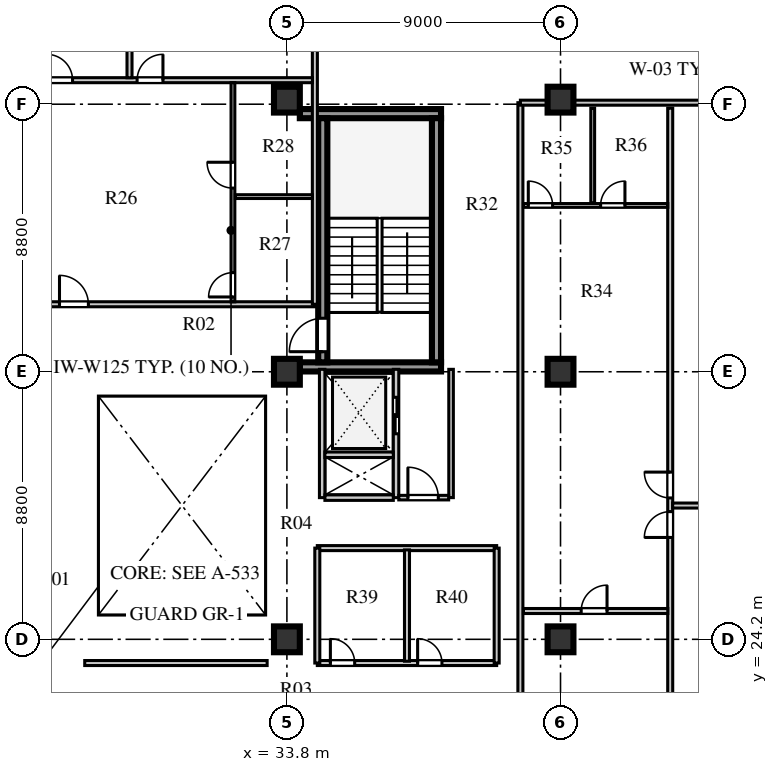
"""IFC4 building model, lengths in metres.
Left out: names, types, materials, properties, quantities, classifications, styles, units other than length and angle.
Written with IfcOpenShell. Run it as: python <this file> out.ifc"""

import sys

from ifc_helpers import new_model, si_unit, direction, frame, frame_2d, origin, origin_2d, place, context, subcontext, project, spatial, rectangle, extrude, element, fill, save


model = new_model("IFC4")
c1 = context("Model", 3, precision=1e-05, world=origin(), true_north=direction((0.0, 1.0)))
c2 = subcontext(c1, "Body", "Model", "MODEL_VIEW")
j1 = project(units=[si_unit("LENGTHUNIT", "METRE"), si_unit("PLANEANGLEUNIT", "RADIAN")], contexts=[c1])
p1 = place(None, origin())
s1 = spatial("IfcSite", under=j1, at=p1, CompositionType="ELEMENT")
p2 = place(p1, origin())
s2 = spatial("IfcBuilding", under=s1, at=p2, CompositionType="ELEMENT")
p3 = place(p2, frame((0.0, 0.0, 253.1)))
s3 = spatial("IfcBuildingStorey", under=s2, at=p3, CompositionType="ELEMENT", Elevation=253.1)
for number, where, z_axis, x_axis in (
    (1, (34.225, 33.16, 0.0), (0.0, 0.0, 1.0), (1.0, 0.0, 0.0)),
    (2, (34.225, 41.49, 0.0), (0.0, 0.0, 1.0), (1.0, 0.0, 0.0)),
):
    element("IfcWall", number, at=place(p3, frame(where, z_axis=z_axis, x_axis=x_axis)), inside=s3, PredefinedType="SHEAR", context=c2, shape_type="SweptSolid", body=[
        extrude(rectangle(XDim=4.645, YDim=0.3, at=frame_2d((2.323, 0.0))), origin(), (0.0, 0.0, 1.0), 3.66),
    ])
p4 = place(p3, frame((34.98, 33.31, 0.0), z_axis=(0.0, 0.0, 1.0), x_axis=(0.0, 1.0, 0.0)))
e3 = element("IfcWall", 3, at=p4, inside=s3, PredefinedType="SHEAR", context=c2, shape_type="SweptSolid", body=[
    extrude(rectangle(XDim=8.03, YDim=0.3, at=frame_2d((4.015, 0.0))), origin(), (0.0, 0.0, 1.0), 3.66),
])
p5 = place(p4, frame((0.35, 0.0, 0.0)))
e4 = element("IfcOpeningElement", 4, at=p5, cuts=e3, PredefinedType="OPENING", context=c2, shape_type="SweptSolid", body=[
    extrude(rectangle(XDim=1.1, YDim=2.1, at=frame_2d((0.55, 1.05))), frame((0.0, 0.16, 0.0), z_axis=(0.0, -1.0, 0.0), x_axis=(1.0, 0.0, 0.0)), (0.0, 0.0, 1.0), 0.32),
])
p6 = place(p3, frame((38.72, 33.31, 0.0), z_axis=(0.0, 0.0, 1.0), x_axis=(0.0, 1.0, 0.0)))
e5 = element("IfcWall", 5, at=p6, inside=s3, PredefinedType="SHEAR", context=c2, shape_type="SweptSolid", body=[
    extrude(rectangle(XDim=8.03, YDim=0.3, at=frame_2d((4.015, 0.0))), origin(), (0.0, 0.0, 1.0), 3.66),
])
for number, where, z_axis, x_axis in (
    (6, (33.8, 24.2, 0.0), (0.0, 0.0, 1.0), (1.0, 0.0, 0.0)),
    (7, (33.8, 33.0, 0.0), (0.0, 0.0, 1.0), (1.0, 0.0, 0.0)),
    (8, (33.8, 41.95, 0.0), (0.0, 0.0, 1.0), (1.0, 0.0, 0.0)),
    (9, (42.8, 24.2, 0.0), (0.0, 0.0, 1.0), (1.0, 0.0, 0.0)),
    (10, (42.8, 33.0, 0.0), (0.0, 0.0, 1.0), (1.0, 0.0, 0.0)),
    (11, (42.8, 41.95, 0.0), (0.0, 0.0, 1.0), (1.0, 0.0, 0.0)),
):
    element("IfcColumn", number, at=place(p3, frame(where, z_axis=z_axis, x_axis=x_axis)), inside=s3, PredefinedType="COLUMN", context=c2, shape_type="SweptSolid", body=[
        extrude(rectangle(XDim=0.85, YDim=0.85, at=origin_2d()), origin(), (0.0, 0.0, 1.0), 3.66),
    ])
p7 = place(p3, frame((34.96, 28.86, 0.0), z_axis=(0.0, 0.0, 1.0), x_axis=(0.0, 1.0, 0.0)))
e12 = element("IfcWall", 12, at=p7, inside=s3, PredefinedType="SOLIDWALL", context=c2, shape_type="SweptSolid", body=[
    extrude(rectangle(XDim=4.22, YDim=0.18, at=frame_2d((2.11, 0.0))), origin(), (0.0, 0.0, 1.0), 3.66),
])
p8 = place(p3, frame((37.39, 28.86, 0.0), z_axis=(0.0, 0.0, 1.0), x_axis=(0.0, 1.0, 0.0)))
e13 = element("IfcWall", 13, at=p8, inside=s3, PredefinedType="SOLIDWALL", context=c2, shape_type="SweptSolid", body=[
    extrude(rectangle(XDim=4.22, YDim=0.18, at=frame_2d((2.11, 0.0))), origin(), (0.0, 0.0, 1.0), 3.66),
])
p9 = place(p8, frame((2.1, 0.0, 0.0)))
e14 = element("IfcOpeningElement", 14, at=p9, cuts=e13, PredefinedType="OPENING", context=c2, shape_type="SweptSolid", body=[
    extrude(rectangle(XDim=1.2, YDim=2.12, at=frame_2d((0.6, 1.06))), frame((0.0, 0.1, 0.0), z_axis=(0.0, -1.0, 0.0), x_axis=(1.0, 0.0, 0.0)), (0.0, 0.0, 1.0), 0.2),
])
for number, where, z_axis, x_axis in (
    (15, (35.05, 28.86, 0.0), (0.0, 0.0, 1.0), (1.0, 0.0, 0.0)),
    (16, (35.05, 30.27, 0.0), (0.0, 0.0, 1.0), (1.0, 0.0, 0.0)),
):
    element("IfcWall", number, at=place(p3, frame(where, z_axis=z_axis, x_axis=x_axis)), inside=s3, PredefinedType="SOLIDWALL", context=c2, shape_type="SweptSolid", body=[
        extrude(rectangle(XDim=2.25, YDim=0.18, at=frame_2d((1.125, 0.0))), origin(), (0.0, 0.0, 1.0), 3.66),
    ])
p10 = place(p3, frame((39.2, 28.86, 0.0), z_axis=(0.0, 0.0, 1.0), x_axis=(0.0, 1.0, 0.0)))
e17 = element("IfcWall", 17, at=p10, inside=s3, PredefinedType="PARTITIONING", context=c2, shape_type="SweptSolid", body=[
    extrude(rectangle(XDim=4.22, YDim=0.15, at=frame_2d((2.11, 0.0))), origin(), (0.0, 0.0, 1.0), 3.66),
])
p11 = place(p3, frame((37.48, 28.86, 0.0), z_axis=(0.0, 0.0, 1.0), x_axis=(1.0, 0.0, 0.0)))
e18 = element("IfcWall", 18, at=p11, inside=s3, PredefinedType="PARTITIONING", context=c2, shape_type="SweptSolid", body=[
    extrude(rectangle(XDim=1.64, YDim=0.15, at=frame_2d((0.82, 0.0))), origin(), (0.0, 0.0, 1.0), 3.66),
])
p12 = place(p11, frame((0.3, 0.0, 0.0)))
e19 = element("IfcOpeningElement", 19, at=p12, cuts=e18, PredefinedType="OPENING", context=c2, shape_type="SweptSolid", body=[
    extrude(rectangle(XDim=1.0, YDim=2.1, at=frame_2d((0.5, 1.05))), frame((0.0, 0.085, 0.0), z_axis=(0.0, -1.0, 0.0), x_axis=(1.0, 0.0, 0.0)), (0.0, 0.0, 1.0), 0.17),
])
p13 = place(p3, frame((27.15, 23.42, 0.0), z_axis=(0.0, 0.0, 1.0), x_axis=(1.0, 0.0, 0.0)))
e20 = element("IfcWall", 20, at=p13, inside=s3, PredefinedType="PARTITIONING", context=c2, shape_type="SweptSolid", body=[
    extrude(rectangle(XDim=6.0, YDim=0.165, at=frame_2d((3.0, 0.0))), origin(), (0.0, 0.0, 1.0), 3.66),
])
p14 = place(p3, frame((25.22, 35.22, 0.0), z_axis=(0.0, 0.0, 1.0), x_axis=(1.0, 0.0, 0.0)))
e21 = element("IfcWall", 21, at=p14, inside=s3, PredefinedType="PARTITIONING", context=c2, shape_type="SweptSolid", body=[
    extrude(rectangle(XDim=9.5, YDim=0.165, at=frame_2d((4.75, 0.0))), origin(), (0.0, 0.0, 1.0), 3.66),
])
p15 = place(p14, frame((1.1, 0.0, 0.0)))
e22 = element("IfcOpeningElement", 22, at=p15, cuts=e21, PredefinedType="OPENING", context=c2, shape_type="SweptSolid", body=[
    extrude(rectangle(XDim=0.95, YDim=2.1, at=frame_2d((0.475, 1.05))), frame((0.0, 0.093, 0.0), z_axis=(0.0, -1.0, 0.0), x_axis=(1.0, 0.0, 0.0)), (0.0, 0.0, 1.0), 0.185),
])
p16 = place(p3, frame((34.72, 35.22, 0.0), z_axis=(0.0, 0.0, 1.0), x_axis=(0.0, 1.0, 0.0)))
e23 = element("IfcWall", 23, at=p16, inside=s3, PredefinedType="PARTITIONING", context=c2, shape_type="SweptSolid", body=[
    extrude(rectangle(XDim=14.1, YDim=0.165, at=frame_2d((7.05, 0.0))), origin(), (0.0, 0.0, 1.0), 3.66),
])
p17 = place(p3, frame((25.3, 42.59, 0.0), z_axis=(0.0, 0.0, 1.0), x_axis=(1.0, 0.0, 0.0)))
e24 = element("IfcWall", 24, at=p17, inside=s3, PredefinedType="PARTITIONING", context=c2, shape_type="SweptSolid", body=[
    extrude(rectangle(XDim=9.34, YDim=0.165, at=frame_2d((4.67, 0.0))), origin(), (0.0, 0.0, 1.0), 3.66),
])
p18 = place(p17, frame((0.6, 0.0, 0.0)))
e25 = element("IfcOpeningElement", 25, at=p18, cuts=e24, PredefinedType="OPENING", context=c2, shape_type="SweptSolid", body=[
    extrude(rectangle(XDim=0.85, YDim=2.08, at=frame_2d((0.425, 1.04))), frame((0.0, 0.093, 0.0), z_axis=(0.0, -1.0, 0.0), x_axis=(1.0, 0.0, 0.0)), (0.0, 0.0, 1.0), 0.185),
])
p19 = place(p17, frame((3.573, 0.0, 0.0)))
e26 = element("IfcOpeningElement", 26, at=p19, cuts=e24, PredefinedType="OPENING", context=c2, shape_type="SweptSolid", body=[
    extrude(rectangle(XDim=0.85, YDim=2.08, at=frame_2d((0.425, 1.04))), frame((0.0, 0.093, 0.0), z_axis=(0.0, -1.0, 0.0), x_axis=(1.0, 0.0, 0.0)), (0.0, 0.0, 1.0), 0.185),
])
p20 = place(p3, frame((32.025, 35.3, 0.0), z_axis=(0.0, 0.0, 1.0), x_axis=(0.0, 1.0, 0.0)))
e27 = element("IfcWall", 27, at=p20, inside=s3, PredefinedType="PLUMBINGWALL", context=c2, shape_type="SweptSolid", body=[
    extrude(rectangle(XDim=7.21, YDim=0.125, at=frame_2d((3.605, 0.0))), origin(), (0.0, 0.0, 1.0), 3.66),
])
p21 = place(p20, frame((0.16, 0.0, 0.0)))
e28 = element("IfcOpeningElement", 28, at=p21, cuts=e27, PredefinedType="OPENING", context=c2, shape_type="SweptSolid", body=[
    extrude(rectangle(XDim=0.8, YDim=2.05, at=frame_2d((0.4, 1.025))), frame((0.0, 0.073, 0.0), z_axis=(0.0, -1.0, 0.0), x_axis=(1.0, 0.0, 0.0)), (0.0, 0.0, 1.0), 0.145),
])
p22 = place(p20, frame((3.741, 0.0, 0.0)))
e29 = element("IfcOpeningElement", 29, at=p22, cuts=e27, PredefinedType="OPENING", context=c2, shape_type="SweptSolid", body=[
    extrude(rectangle(XDim=0.85, YDim=2.08, at=frame_2d((0.425, 1.04))), frame((0.0, 0.073, 0.0), z_axis=(0.0, -1.0, 0.0), x_axis=(1.0, 0.0, 0.0)), (0.0, 0.0, 1.0), 0.145),
])
p23 = place(p3, frame((32.105, 38.761, 0.0), z_axis=(0.0, 0.0, 1.0), x_axis=(1.0, 0.0, 0.0)))
e30 = element("IfcWall", 30, at=p23, inside=s3, PredefinedType="PLUMBINGWALL", context=c2, shape_type="SweptSolid", body=[
    extrude(rectangle(XDim=2.535, YDim=0.125, at=frame_2d((1.268, 0.0))), origin(), (0.0, 0.0, 1.0), 3.66),
])
p24 = place(p3, frame((28.623, 42.67, 0.0), z_axis=(0.0, 0.0, 1.0), x_axis=(0.0, 1.0, 0.0)))
e31 = element("IfcWall", 31, at=p24, inside=s3, PredefinedType="PARTITIONING", context=c2, shape_type="SweptSolid", body=[
    extrude(rectangle(XDim=6.65, YDim=0.165, at=frame_2d((3.325, 0.0))), origin(), (0.0, 0.0, 1.0), 3.66),
])
p25 = place(p3, frame((41.48, 15.35, 0.0), z_axis=(0.0, 0.0, 1.0), x_axis=(0.0, 1.0, 0.0)))
e32 = element("IfcWall", 32, at=p25, inside=s3, PredefinedType="PARTITIONING", context=c2, shape_type="SweptSolid", body=[
    extrude(rectangle(XDim=26.5, YDim=0.165, at=frame_2d((13.25, 0.0))), origin(), (0.0, 0.0, 1.0), 3.66),
])
p26 = place(p25, frame((0.75, 0.0, 0.0)))
e33 = element("IfcOpeningElement", 33, at=p26, cuts=e32, PredefinedType="OPENING", context=c2, shape_type="SweptSolid", body=[
    extrude(rectangle(XDim=0.95, YDim=2.1, at=frame_2d((0.475, 1.05))), frame((0.0, 0.093, 0.0), z_axis=(0.0, -1.0, 0.0), x_axis=(1.0, 0.0, 0.0)), (0.0, 0.0, 1.0), 0.185),
])
p27 = place(p3, frame((41.48, 41.85, 0.0), z_axis=(0.0, 0.0, 1.0), x_axis=(1.0, 0.0, 0.0)))
e34 = element("IfcWall", 34, at=p27, inside=s3, PredefinedType="PARTITIONING", context=c2, shape_type="SweptSolid", body=[
    extrude(rectangle(XDim=9.04, YDim=0.165, at=frame_2d((4.52, 0.0))), origin(), (0.0, 0.0, 1.0), 3.06),
])
p28 = place(p3, frame((46.408, 15.53, 0.0), z_axis=(0.0, 0.0, 1.0), x_axis=(0.0, 1.0, 0.0)))
e35 = element("IfcWall", 35, at=p28, inside=s3, PredefinedType="PARTITIONING", context=c2, shape_type="SweptSolid", body=[
    extrude(rectangle(XDim=26.14, YDim=0.165, at=frame_2d((13.07, 0.0))), origin(), (0.0, 0.0, 1.0), 3.66),
])
p29 = place(p28, frame((12.02, 0.0, 0.0)))
e36 = element("IfcOpeningElement", 36, at=p29, cuts=e35, PredefinedType="OPENING", context=c2, shape_type="SweptSolid", body=[
    extrude(rectangle(XDim=0.85, YDim=2.08, at=frame_2d((0.425, 1.04))), frame((0.0, 0.093, 0.0), z_axis=(0.0, -1.0, 0.0), x_axis=(1.0, 0.0, 0.0)), (0.0, 0.0, 1.0), 0.185),
])
p30 = place(p28, frame((13.32, 0.0, 0.0)))
e37 = element("IfcOpeningElement", 37, at=p30, cuts=e35, PredefinedType="OPENING", context=c2, shape_type="SweptSolid", body=[
    extrude(rectangle(XDim=0.85, YDim=2.08, at=frame_2d((0.425, 1.04))), frame((0.0, 0.093, 0.0), z_axis=(0.0, -1.0, 0.0), x_axis=(1.0, 0.0, 0.0)), (0.0, 0.0, 1.0), 0.185),
])
p31 = place(p3, frame((41.58, 38.47, 0.0), z_axis=(0.0, 0.0, 1.0), x_axis=(1.0, 0.0, 0.0)))
e38 = element("IfcWall", 38, at=p31, inside=s3, PredefinedType="PLUMBINGWALL", context=c2, shape_type="SweptSolid", body=[
    extrude(rectangle(XDim=4.748, YDim=0.125, at=frame_2d((2.374, 0.0))), origin(), (0.0, 0.0, 1.0), 3.66),
])
p32 = place(p31, frame((0.16, 0.0, 0.0)))
e39 = element("IfcOpeningElement", 39, at=p32, cuts=e38, PredefinedType="OPENING", context=c2, shape_type="SweptSolid", body=[
    extrude(rectangle(XDim=0.8, YDim=2.05, at=frame_2d((0.4, 1.025))), frame((0.0, 0.073, 0.0), z_axis=(0.0, -1.0, 0.0), x_axis=(1.0, 0.0, 0.0)), (0.0, 0.0, 1.0), 0.145),
])
p33 = place(p31, frame((2.539, 0.0, 0.0)))
e40 = element("IfcOpeningElement", 40, at=p33, cuts=e38, PredefinedType="OPENING", context=c2, shape_type="SweptSolid", body=[
    extrude(rectangle(XDim=0.8, YDim=2.05, at=frame_2d((0.4, 1.025))), frame((0.0, 0.073, 0.0), z_axis=(0.0, -1.0, 0.0), x_axis=(1.0, 0.0, 0.0)), (0.0, 0.0, 1.0), 0.145),
])
p34 = place(p3, frame((43.859, 38.55, 0.0), z_axis=(0.0, 0.0, 1.0), x_axis=(0.0, 1.0, 0.0)))
e41 = element("IfcWall", 41, at=p34, inside=s3, PredefinedType="PLUMBINGWALL", context=c2, shape_type="SweptSolid", body=[
    extrude(rectangle(XDim=3.12, YDim=0.125, at=frame_2d((1.56, 0.0))), origin(), (0.0, 0.0, 1.0), 3.66),
])
p35 = place(p3, frame((41.58, 25.131, 0.0), z_axis=(0.0, 0.0, 1.0), x_axis=(1.0, 0.0, 0.0)))
e42 = element("IfcWall", 42, at=p35, inside=s3, PredefinedType="PARTITIONING", context=c2, shape_type="SweptSolid", body=[
    extrude(rectangle(XDim=4.748, YDim=0.165, at=frame_2d((2.374, 0.0))), origin(), (0.0, 0.0, 1.0), 3.66),
])
p36 = place(p35, frame((1.9, 0.0, 0.0)))
e43 = element("IfcOpeningElement", 43, at=p36, cuts=e42, PredefinedType="OPENING", context=c2, shape_type="SweptSolid", body=[
    extrude(rectangle(XDim=0.85, YDim=2.08, at=frame_2d((0.425, 1.04))), frame((0.0, 0.093, 0.0), z_axis=(0.0, -1.0, 0.0), x_axis=(1.0, 0.0, 0.0)), (0.0, 0.0, 1.0), 0.185),
])
p37 = place(p3, frame((46.488, 28.6, 0.0), z_axis=(0.0, 0.0, 1.0), x_axis=(1.0, 0.0, 0.0)))
e44 = element("IfcWall", 44, at=p37, inside=s3, PredefinedType="PARTITIONING", context=c2, shape_type="SweptSolid", body=[
    extrude(rectangle(XDim=4.032, YDim=0.165, at=frame_2d((2.016, 0.0))), origin(), (0.0, 0.0, 1.0), 3.66),
])
p38 = place(p3, frame((34.8, 23.42, 0.0), z_axis=(0.0, 0.0, 1.0), x_axis=(1.0, 0.0, 0.0)))
e45 = element("IfcWall", 45, at=p38, inside=s3, PredefinedType="PARTITIONING", context=c2, shape_type="SweptSolid", body=[
    extrude(rectangle(XDim=5.9, YDim=0.165, at=frame_2d((2.95, 0.0))), origin(), (0.0, 0.0, 1.0), 3.66),
])
p39 = place(p38, frame((0.43, 0.0, 0.0)))
e46 = element("IfcOpeningElement", 46, at=p39, cuts=e45, PredefinedType="OPENING", context=c2, shape_type="SweptSolid", body=[
    extrude(rectangle(XDim=0.8, YDim=2.05, at=frame_2d((0.4, 1.025))), frame((0.0, 0.093, 0.0), z_axis=(0.0, -1.0, 0.0), x_axis=(1.0, 0.0, 0.0)), (0.0, 0.0, 1.0), 0.185),
])
p40 = place(p38, frame((3.3, 0.0, 0.0)))
e47 = element("IfcOpeningElement", 47, at=p40, cuts=e45, PredefinedType="OPENING", context=c2, shape_type="SweptSolid", body=[
    extrude(rectangle(XDim=0.8, YDim=2.05, at=frame_2d((0.4, 1.025))), frame((0.0, 0.093, 0.0), z_axis=(0.0, -1.0, 0.0), x_axis=(1.0, 0.0, 0.0)), (0.0, 0.0, 1.0), 0.185),
])
p41 = place(p3, frame((34.8, 27.2, 0.0), z_axis=(0.0, 0.0, 1.0), x_axis=(1.0, 0.0, 0.0)))
e48 = element("IfcWall", 48, at=p41, inside=s3, PredefinedType="PARTITIONING", context=c2, shape_type="SweptSolid", body=[
    extrude(rectangle(XDim=5.9, YDim=0.165, at=frame_2d((2.95, 0.0))), origin(), (0.0, 0.0, 1.0), 3.31),
])
for number, where, z_axis, x_axis in (
    (49, (34.8, 23.42, 0.0), (0.0, 0.0, 1.0), (0.0, 1.0, 0.0)),
    (50, (40.7, 23.42, 0.0), (0.0, 0.0, 1.0), (0.0, 1.0, 0.0)),
):
    element("IfcWall", number, at=place(p3, frame(where, z_axis=z_axis, x_axis=x_axis)), inside=s3, PredefinedType="PARTITIONING", context=c2, shape_type="SweptSolid", body=[
        extrude(rectangle(XDim=3.78, YDim=0.165, at=frame_2d((1.89, 0.0))), origin(), (0.0, 0.0, 1.0), 3.66),
    ])
p42 = place(p3, frame((37.75, 23.48, 0.0), z_axis=(0.0, 0.0, 1.0), x_axis=(0.0, 1.0, 0.0)))
e51 = element("IfcWall", 51, at=p42, inside=s3, PredefinedType="PARTITIONING", context=c2, shape_type="SweptSolid", body=[
    extrude(rectangle(XDim=3.66, YDim=0.165, at=frame_2d((1.83, 0.0))), origin(), (0.0, 0.0, 1.0), 3.66),
])
p43 = place(p5, origin())
e52 = element("IfcDoor", 52, at=p43, inside=s3, OperationType="SINGLE_SWING_LEFT", PredefinedType="DOOR", context=c2, shape_type="SweptSolid", body=[
    extrude(rectangle(XDim=1.1, YDim=2.1, at=frame_2d((0.55, 1.05))), frame((0.0, 0.025, 0.0), z_axis=(0.0, -1.0, 0.0), x_axis=(1.0, 0.0, 0.0)), (0.0, 0.0, 1.0), 0.05),
])
fill(e4, e52)
p44 = place(p9, frame((1.2, 0.0, 0.0), z_axis=(0.0, 0.0, 1.0), x_axis=(-1.0, 0.0, 0.0)))
e53 = element("IfcDoor", 53, at=p44, inside=s3, OperationType="DOUBLE_DOOR_SLIDING", PredefinedType="DOOR", context=c2, shape_type="SweptSolid", body=[
    extrude(rectangle(XDim=1.2, YDim=2.12, at=frame_2d((0.6, 1.06))), frame((0.0, 0.025, 0.0), z_axis=(0.0, -1.0, 0.0), x_axis=(1.0, 0.0, 0.0)), (0.0, 0.0, 1.0), 0.05),
])
fill(e14, e53)
p45 = place(p12, origin())
e54 = element("IfcDoor", 54, at=p45, inside=s3, OperationType="SINGLE_SWING_LEFT", PredefinedType="DOOR", context=c2, shape_type="SweptSolid", body=[
    extrude(rectangle(XDim=1.0, YDim=2.1, at=frame_2d((0.5, 1.05))), frame((0.0, 0.025, 0.0), z_axis=(0.0, -1.0, 0.0), x_axis=(1.0, 0.0, 0.0)), (0.0, 0.0, 1.0), 0.05),
])
fill(e19, e54)
p46 = place(p21, origin())
e55 = element("IfcDoor", 55, at=p46, inside=s3, OperationType="SINGLE_SWING_LEFT", PredefinedType="DOOR", context=c2, shape_type="SweptSolid", body=[
    extrude(rectangle(XDim=0.8, YDim=2.05, at=frame_2d((0.4, 1.025))), frame((0.0, 0.025, 0.0), z_axis=(0.0, -1.0, 0.0), x_axis=(1.0, 0.0, 0.0)), (0.0, 0.0, 1.0), 0.05),
])
fill(e28, e55)
p47 = place(p22, origin())
e56 = element("IfcDoor", 56, at=p47, inside=s3, OperationType="SINGLE_SWING_RIGHT", PredefinedType="DOOR", context=c2, shape_type="SweptSolid", body=[
    extrude(rectangle(XDim=0.85, YDim=2.08, at=frame_2d((0.425, 1.04))), frame((0.0, 0.025, 0.0), z_axis=(0.0, -1.0, 0.0), x_axis=(1.0, 0.0, 0.0)), (0.0, 0.0, 1.0), 0.05),
])
fill(e29, e56)
p48 = place(p18, origin())
e57 = element("IfcDoor", 57, at=p48, inside=s3, OperationType="SINGLE_SWING_LEFT", PredefinedType="DOOR", context=c2, shape_type="SweptSolid", body=[
    extrude(rectangle(XDim=0.85, YDim=2.08, at=frame_2d((0.425, 1.04))), frame((0.0, 0.025, 0.0), z_axis=(0.0, -1.0, 0.0), x_axis=(1.0, 0.0, 0.0)), (0.0, 0.0, 1.0), 0.05),
])
fill(e25, e57)
p49 = place(p19, origin())
e58 = element("IfcDoor", 58, at=p49, inside=s3, OperationType="SINGLE_SWING_RIGHT", PredefinedType="DOOR", context=c2, shape_type="SweptSolid", body=[
    extrude(rectangle(XDim=0.85, YDim=2.08, at=frame_2d((0.425, 1.04))), frame((0.0, 0.025, 0.0), z_axis=(0.0, -1.0, 0.0), x_axis=(1.0, 0.0, 0.0)), (0.0, 0.0, 1.0), 0.05),
])
fill(e26, e58)
p50 = place(p15, origin())
e59 = element("IfcDoor", 59, at=p50, inside=s3, OperationType="SINGLE_SWING_LEFT", PredefinedType="DOOR", context=c2, shape_type="SweptSolid", body=[
    extrude(rectangle(XDim=0.95, YDim=2.1, at=frame_2d((0.475, 1.05))), frame((0.0, 0.025, 0.0), z_axis=(0.0, -1.0, 0.0), x_axis=(1.0, 0.0, 0.0)), (0.0, 0.0, 1.0), 0.05),
])
fill(e22, e59)
p51 = place(p36, frame((0.85, 0.0, 0.0), z_axis=(0.0, 0.0, 1.0), x_axis=(-1.0, 0.0, 0.0)))
e60 = element("IfcDoor", 60, at=p51, inside=s3, OperationType="SINGLE_SWING_LEFT", PredefinedType="DOOR", context=c2, shape_type="SweptSolid", body=[
    extrude(rectangle(XDim=0.85, YDim=2.08, at=frame_2d((0.425, 1.04))), frame((0.0, 0.025, 0.0), z_axis=(0.0, -1.0, 0.0), x_axis=(1.0, 0.0, 0.0)), (0.0, 0.0, 1.0), 0.05),
])
fill(e43, e60)
p52 = place(p32, origin())
e61 = element("IfcDoor", 61, at=p52, inside=s3, OperationType="SINGLE_SWING_LEFT", PredefinedType="DOOR", context=c2, shape_type="SweptSolid", body=[
    extrude(rectangle(XDim=0.8, YDim=2.05, at=frame_2d((0.4, 1.025))), frame((0.0, 0.025, 0.0), z_axis=(0.0, -1.0, 0.0), x_axis=(1.0, 0.0, 0.0)), (0.0, 0.0, 1.0), 0.05),
])
fill(e39, e61)
p53 = place(p33, origin())
e62 = element("IfcDoor", 62, at=p53, inside=s3, OperationType="SINGLE_SWING_RIGHT", PredefinedType="DOOR", context=c2, shape_type="SweptSolid", body=[
    extrude(rectangle(XDim=0.8, YDim=2.05, at=frame_2d((0.4, 1.025))), frame((0.0, 0.025, 0.0), z_axis=(0.0, -1.0, 0.0), x_axis=(1.0, 0.0, 0.0)), (0.0, 0.0, 1.0), 0.05),
])
fill(e40, e62)
p54 = place(p29, origin())
e63 = element("IfcDoor", 63, at=p54, inside=s3, OperationType="SINGLE_SWING_LEFT", PredefinedType="DOOR", context=c2, shape_type="SweptSolid", body=[
    extrude(rectangle(XDim=0.85, YDim=2.08, at=frame_2d((0.425, 1.04))), frame((0.0, 0.025, 0.0), z_axis=(0.0, -1.0, 0.0), x_axis=(1.0, 0.0, 0.0)), (0.0, 0.0, 1.0), 0.05),
])
fill(e36, e63)
p55 = place(p30, origin())
e64 = element("IfcDoor", 64, at=p55, inside=s3, OperationType="SINGLE_SWING_RIGHT", PredefinedType="DOOR", context=c2, shape_type="SweptSolid", body=[
    extrude(rectangle(XDim=0.85, YDim=2.08, at=frame_2d((0.425, 1.04))), frame((0.0, 0.025, 0.0), z_axis=(0.0, -1.0, 0.0), x_axis=(1.0, 0.0, 0.0)), (0.0, 0.0, 1.0), 0.05),
])
fill(e37, e64)
p56 = place(p39, origin())
e65 = element("IfcDoor", 65, at=p56, inside=s3, OperationType="SINGLE_SWING_LEFT", PredefinedType="DOOR", context=c2, shape_type="SweptSolid", body=[
    extrude(rectangle(XDim=0.8, YDim=2.05, at=frame_2d((0.4, 1.025))), frame((0.0, 0.025, 0.0), z_axis=(0.0, -1.0, 0.0), x_axis=(1.0, 0.0, 0.0)), (0.0, 0.0, 1.0), 0.05),
])
fill(e46, e65)
p57 = place(p40, origin())
e66 = element("IfcDoor", 66, at=p57, inside=s3, OperationType="SINGLE_SWING_LEFT", PredefinedType="DOOR", context=c2, shape_type="SweptSolid", body=[
    extrude(rectangle(XDim=0.8, YDim=2.05, at=frame_2d((0.4, 1.025))), frame((0.0, 0.025, 0.0), z_axis=(0.0, -1.0, 0.0), x_axis=(1.0, 0.0, 0.0)), (0.0, 0.0, 1.0), 0.05),
])
fill(e47, e66)
save(model, sys.argv[1])
